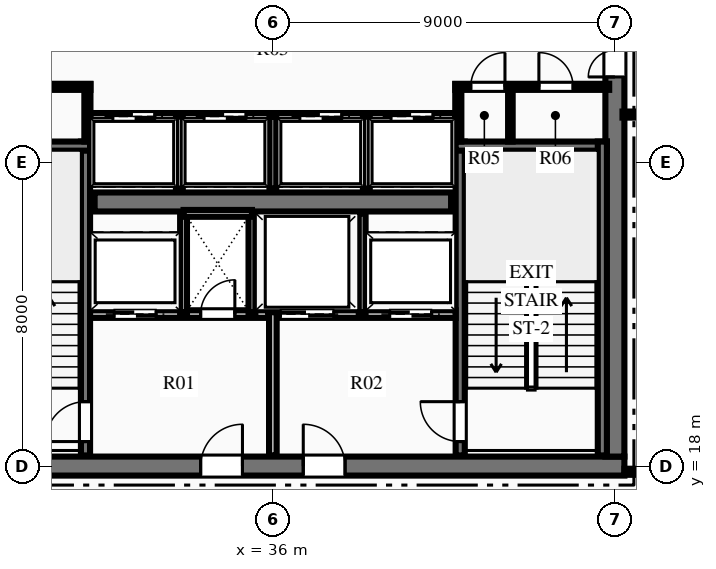
"""IFC4 building model, lengths in metres.
Left out: names, types, materials, properties, quantities, classifications, styles, units other than length and angle.
Written with IfcOpenShell. Run it as: python <this file> out.ifc"""

import sys

from ifc_helpers import new_model, si_unit, direction, frame, frame_2d, origin, place, context, subcontext, project, spatial, rectangle, extrude, element, fill, save


model = new_model("IFC4")
c1 = context("Model", 3, precision=1e-05, world=origin(), true_north=direction((0.0, 1.0)))
c2 = subcontext(c1, "Body", "Model", "MODEL_VIEW")
j1 = project(units=[si_unit("LENGTHUNIT", "METRE"), si_unit("PLANEANGLEUNIT", "RADIAN")], contexts=[c1])
p1 = place(None, origin())
s1 = spatial("IfcSite", under=j1, at=p1, CompositionType="ELEMENT")
p2 = place(p1, origin())
s2 = spatial("IfcBuilding", under=s1, at=p2, CompositionType="ELEMENT")
p3 = place(p2, frame((0.0, 0.0, 217.2)))
s3 = spatial("IfcBuildingStorey", under=s2, at=p3, CompositionType="ELEMENT", Elevation=217.2)
p4 = place(p3, frame((26.75, 18.0, 0.0), z_axis=(0.0, 0.0, 1.0), x_axis=(1.0, 0.0, 0.0)))
e1 = element("IfcWall", 1, at=p4, inside=s3, PredefinedType="SHEAR", context=c2, shape_type="SweptSolid", body=[
    extrude(rectangle(XDim=18.5, YDim=0.5, at=frame_2d((9.25, 0.0))), origin(), (0.0, 0.0, 1.0), 3.75),
])
p5 = place(p4, frame((7.35, 0.0, 0.0)))
e2 = element("IfcOpeningElement", 2, at=p5, cuts=e1, PredefinedType="OPENING", context=c2, shape_type="SweptSolid", body=[
    extrude(rectangle(XDim=1.1, YDim=2.15, at=frame_2d((0.55, 1.075))), frame((0.0, 0.26, 0.0), z_axis=(0.0, -1.0, 0.0), x_axis=(1.0, 0.0, 0.0)), (0.0, 0.0, 1.0), 0.52),
])
p6 = place(p4, frame((10.05, 0.0, 0.0)))
e3 = element("IfcOpeningElement", 3, at=p6, cuts=e1, PredefinedType="OPENING", context=c2, shape_type="SweptSolid", body=[
    extrude(rectangle(XDim=1.1, YDim=2.15, at=frame_2d((0.55, 1.075))), frame((0.0, 0.26, 0.0), z_axis=(0.0, -1.0, 0.0), x_axis=(1.0, 0.0, 0.0)), (0.0, 0.0, 1.0), 0.52),
])
p7 = place(p3, frame((45.0, 18.25, 0.0), z_axis=(0.0, 0.0, 1.0), x_axis=(0.0, 1.0, 0.0)))
e4 = element("IfcWall", 4, at=p7, inside=s3, PredefinedType="SHEAR", context=c2, shape_type="SweptSolid", body=[
    extrude(rectangle(XDim=15.5, YDim=0.5, at=frame_2d((7.75, 0.0))), origin(), (0.0, 0.0, 1.0), 3.75),
])
p8 = place(p7, frame((9.99, 0.0, 0.0)))
e5 = element("IfcOpeningElement", 5, at=p8, cuts=e4, PredefinedType="OPENING", context=c2, shape_type="SweptSolid", body=[
    extrude(rectangle(XDim=1.4, YDim=2.2, at=frame_2d((0.7, 1.1))), frame((0.0, 0.26, 0.0), z_axis=(0.0, -1.0, 0.0), x_axis=(1.0, 0.0, 0.0)), (0.0, 0.0, 1.0), 0.52),
])
p9 = place(p3, frame((31.31, 24.95, 0.0), z_axis=(0.0, 0.0, 1.0), x_axis=(1.0, 0.0, 0.0)))
e6 = element("IfcWall", 6, at=p9, inside=s3, PredefinedType="SHEAR", context=c2, shape_type="SweptSolid", body=[
    extrude(rectangle(XDim=9.38, YDim=0.5, at=frame_2d((4.69, 0.0))), origin(), (0.0, 0.0, 1.0), 3.75),
])
p10 = place(p3, frame((31.07, 18.28, 0.0), z_axis=(0.0, 0.0, 1.0), x_axis=(0.0, 1.0, 0.0)))
e7 = element("IfcWall", 7, at=p10, inside=s3, PredefinedType="SHEAR", context=c2, shape_type="SweptSolid", body=[
    extrude(rectangle(XDim=8.26, YDim=0.24, at=frame_2d((4.13, 0.0))), origin(), (0.0, 0.0, 1.0), 3.75),
])
p11 = place(p10, frame((0.365, 0.0, 0.0)))
e8 = element("IfcOpeningElement", 8, at=p11, cuts=e7, PredefinedType="OPENING", context=c2, shape_type="SweptSolid", body=[
    extrude(rectangle(XDim=1.05, YDim=2.15, at=frame_2d((0.525, 1.075))), frame((0.0, 0.13, 0.0), z_axis=(0.0, -1.0, 0.0), x_axis=(1.0, 0.0, 0.0)), (0.0, 0.0, 1.0), 0.26),
])
p12 = place(p3, frame((27.21, 26.42, 0.0), z_axis=(0.0, 0.0, 1.0), x_axis=(1.0, 0.0, 0.0)))
e9 = element("IfcWall", 9, at=p12, inside=s3, PredefinedType="SHEAR", context=c2, shape_type="SweptSolid", body=[
    extrude(rectangle(XDim=3.98, YDim=0.24, at=frame_2d((1.99, 0.0))), origin(), (0.0, 0.0, 1.0), 3.75),
])
p13 = place(p3, frame((40.93, 18.28, 0.0), z_axis=(0.0, 0.0, 1.0), x_axis=(0.0, 1.0, 0.0)))
e10 = element("IfcWall", 10, at=p13, inside=s3, PredefinedType="SHEAR", context=c2, shape_type="SweptSolid", body=[
    extrude(rectangle(XDim=8.26, YDim=0.24, at=frame_2d((4.13, 0.0))), origin(), (0.0, 0.0, 1.0), 3.75),
])
p14 = place(p13, frame((0.365, 0.0, 0.0)))
e11 = element("IfcOpeningElement", 11, at=p14, cuts=e10, PredefinedType="OPENING", context=c2, shape_type="SweptSolid", body=[
    extrude(rectangle(XDim=1.05, YDim=2.15, at=frame_2d((0.525, 1.075))), frame((0.0, 0.13, 0.0), z_axis=(0.0, -1.0, 0.0), x_axis=(1.0, 0.0, 0.0)), (0.0, 0.0, 1.0), 0.26),
])
p15 = place(p3, frame((40.81, 26.42, 0.0), z_axis=(0.0, 0.0, 1.0), x_axis=(1.0, 0.0, 0.0)))
e12 = element("IfcWall", 12, at=p15, inside=s3, PredefinedType="SHEAR", context=c2, shape_type="SweptSolid", body=[
    extrude(rectangle(XDim=3.98, YDim=0.24, at=frame_2d((1.99, 0.0))), origin(), (0.0, 0.0, 1.0), 3.75),
])
p16 = place(p3, frame((44.67, 18.28, 0.0), z_axis=(0.0, 0.0, 1.0), x_axis=(0.0, 1.0, 0.0)))
e13 = element("IfcWall", 13, at=p16, inside=s3, PredefinedType="SHEAR", context=c2, shape_type="SweptSolid", body=[
    extrude(rectangle(XDim=8.26, YDim=0.24, at=frame_2d((4.13, 0.0))), origin(), (0.0, 0.0, 1.0), 3.75),
])
p17 = place(p3, frame((36.0, 18.28, 0.0), z_axis=(0.0, 0.0, 1.0), x_axis=(0.0, 1.0, 0.0)))
e14 = element("IfcWall", 14, at=p17, inside=s3, PredefinedType="PARTITIONING", context=c2, shape_type="SweptSolid", body=[
    extrude(rectangle(XDim=3.77, YDim=0.2, at=frame_2d((1.885, 0.0))), origin(), (0.0, 0.0, 1.0), 3.47),
])
p18 = place(p3, frame((31.19, 22.0, 0.0), z_axis=(0.0, 0.0, 1.0), x_axis=(1.0, 0.0, 0.0)))
e15 = element("IfcWall", 15, at=p18, inside=s3, PredefinedType="PARTITIONING", context=c2, shape_type="SweptSolid", body=[
    extrude(rectangle(XDim=4.69, YDim=0.2, at=frame_2d((2.345, 0.0))), origin(), (0.0, 0.0, 1.0), 3.47),
])
p19 = place(p18, frame((2.91, 0.0, 0.0)))
e16 = element("IfcOpeningElement", 16, at=p19, cuts=e15, PredefinedType="OPENING", context=c2, shape_type="SweptSolid", body=[
    extrude(rectangle(XDim=0.9, YDim=2.15, at=frame_2d((0.45, 1.075))), frame((0.0, 0.11, 0.0), z_axis=(0.0, -1.0, 0.0), x_axis=(1.0, 0.0, 0.0)), (0.0, 0.0, 1.0), 0.22),
])
p20 = place(p18, frame((0.635, 0.0, 0.0)))
e17 = element("IfcOpeningElement", 17, at=p20, cuts=e15, PredefinedType="OPENING", context=c2, shape_type="SweptSolid", body=[
    extrude(rectangle(XDim=1.1, YDim=2.15, at=frame_2d((0.55, 1.075))), frame((0.0, 0.11, 0.0), z_axis=(0.0, -1.0, 0.0), x_axis=(1.0, 0.0, 0.0)), (0.0, 0.0, 1.0), 0.22),
])
p21 = place(p3, frame((36.12, 22.0, 0.0), z_axis=(0.0, 0.0, 1.0), x_axis=(1.0, 0.0, 0.0)))
e18 = element("IfcWall", 18, at=p21, inside=s3, PredefinedType="PARTITIONING", context=c2, shape_type="SweptSolid", body=[
    extrude(rectangle(XDim=4.69, YDim=0.2, at=frame_2d((2.345, 0.0))), origin(), (0.0, 0.0, 1.0), 3.47),
])
p22 = place(p21, frame((2.955, 0.0, 0.0)))
e19 = element("IfcOpeningElement", 19, at=p22, cuts=e18, PredefinedType="OPENING", context=c2, shape_type="SweptSolid", body=[
    extrude(rectangle(XDim=1.1, YDim=2.15, at=frame_2d((0.55, 1.075))), frame((0.0, 0.11, 0.0), z_axis=(0.0, -1.0, 0.0), x_axis=(1.0, 0.0, 0.0)), (0.0, 0.0, 1.0), 0.22),
])
p23 = place(p21, frame((0.08, 0.0, 0.0)))
e20 = element("IfcOpeningElement", 20, at=p23, cuts=e18, PredefinedType="OPENING", context=c2, shape_type="SweptSolid", body=[
    extrude(rectangle(XDim=1.4, YDim=2.2, at=frame_2d((0.7, 1.1))), frame((0.0, 0.11, 0.0), z_axis=(0.0, -1.0, 0.0), x_axis=(1.0, 0.0, 0.0)), (0.0, 0.0, 1.0), 0.22),
])
for number, where, z_axis, x_axis in (
    (21, (33.65, 22.05, 0.0), (0.0, 0.0, 1.0), (0.0, 1.0, 0.0)),
    (22, (35.45, 22.05, 0.0), (0.0, 0.0, 1.0), (0.0, 1.0, 0.0)),
):
    element("IfcWall", number, at=place(p3, frame(where, z_axis=z_axis, x_axis=x_axis)), inside=s3, PredefinedType="PARTITIONING", context=c2, shape_type="SweptSolid", body=[
        extrude(rectangle(XDim=2.6, YDim=0.18, at=frame_2d((1.3, 0.0))), origin(), (0.0, 0.0, 1.0), 3.47),
    ])
p24 = place(p3, frame((33.65, 24.65, 0.0), z_axis=(0.0, 0.0, 1.0), x_axis=(1.0, 0.0, 0.0)))
e23 = element("IfcWall", 23, at=p24, inside=s3, PredefinedType="PARTITIONING", context=c2, shape_type="SweptSolid", body=[
    extrude(rectangle(XDim=1.8, YDim=0.18, at=frame_2d((0.9, 0.0))), origin(), (0.0, 0.0, 1.0), 3.47),
])
p25 = place(p3, frame((38.35, 22.05, 0.0), z_axis=(0.0, 0.0, 1.0), x_axis=(0.0, 1.0, 0.0)))
e24 = element("IfcWall", 24, at=p25, inside=s3, PredefinedType="PARTITIONING", context=c2, shape_type="SweptSolid", body=[
    extrude(rectangle(XDim=2.6, YDim=0.18, at=frame_2d((1.3, 0.0))), origin(), (0.0, 0.0, 1.0), 3.47),
])
p26 = place(p3, frame((27.15, 27.98, 0.0), z_axis=(0.0, 0.0, 1.0), x_axis=(1.0, 0.0, 0.0)))
e25 = element("IfcWall", 25, at=p26, inside=s3, PredefinedType="PARTITIONING", context=c2, shape_type="SweptSolid", body=[
    extrude(rectangle(XDim=4.05, YDim=0.16, at=frame_2d((2.025, 0.0))), origin(), (0.0, 0.0, 1.0), 3.47),
])
p27 = place(p26, frame((1.625, 0.0, 0.0)))
e26 = element("IfcOpeningElement", 26, at=p27, cuts=e25, PredefinedType="OPENING", context=c2, shape_type="SweptSolid", body=[
    extrude(rectangle(XDim=0.95, YDim=2.15, at=frame_2d((0.475, 1.075))), frame((0.0, 0.09, 0.0), z_axis=(0.0, -1.0, 0.0), x_axis=(1.0, 0.0, 0.0)), (0.0, 0.0, 1.0), 0.18),
])
p28 = place(p3, frame((31.12, 26.54, 0.0), z_axis=(0.0, 0.0, 1.0), x_axis=(0.0, 1.0, 0.0)))
e27 = element("IfcWall", 27, at=p28, inside=s3, PredefinedType="PARTITIONING", context=c2, shape_type="SweptSolid", body=[
    extrude(rectangle(XDim=1.51, YDim=0.16, at=frame_2d((0.755, 0.0))), origin(), (0.0, 0.0, 1.0), 3.47),
])
p29 = place(p3, frame((40.8, 27.98, 0.0), z_axis=(0.0, 0.0, 1.0), x_axis=(1.0, 0.0, 0.0)))
e28 = element("IfcWall", 28, at=p29, inside=s3, PredefinedType="PARTITIONING", context=c2, shape_type="SweptSolid", body=[
    extrude(rectangle(XDim=4.05, YDim=0.16, at=frame_2d((2.025, 0.0))), origin(), (0.0, 0.0, 1.0), 3.47),
])
p30 = place(p29, frame((0.407, 0.0, 0.0)))
e29 = element("IfcOpeningElement", 29, at=p30, cuts=e28, PredefinedType="OPENING", context=c2, shape_type="SweptSolid", body=[
    extrude(rectangle(XDim=0.9, YDim=2.15, at=frame_2d((0.45, 1.075))), frame((0.0, 0.09, 0.0), z_axis=(0.0, -1.0, 0.0), x_axis=(1.0, 0.0, 0.0)), (0.0, 0.0, 1.0), 0.18),
])
p31 = place(p29, frame((2.2, 0.0, 0.0)))
e30 = element("IfcOpeningElement", 30, at=p31, cuts=e28, PredefinedType="OPENING", context=c2, shape_type="SweptSolid", body=[
    extrude(rectangle(XDim=0.9, YDim=2.15, at=frame_2d((0.45, 1.075))), frame((0.0, 0.09, 0.0), z_axis=(0.0, -1.0, 0.0), x_axis=(1.0, 0.0, 0.0)), (0.0, 0.0, 1.0), 0.18),
])
p32 = place(p3, frame((40.88, 26.54, 0.0), z_axis=(0.0, 0.0, 1.0), x_axis=(0.0, 1.0, 0.0)))
e31 = element("IfcWall", 31, at=p32, inside=s3, PredefinedType="PARTITIONING", context=c2, shape_type="SweptSolid", body=[
    extrude(rectangle(XDim=1.51, YDim=0.16, at=frame_2d((0.755, 0.0))), origin(), (0.0, 0.0, 1.0), 3.47),
])
p33 = place(p3, frame((42.25, 26.54, 0.0), z_axis=(0.0, 0.0, 1.0), x_axis=(0.0, 1.0, 0.0)))
e32 = element("IfcWall", 32, at=p33, inside=s3, PredefinedType="PARTITIONING", context=c2, shape_type="SweptSolid", body=[
    extrude(rectangle(XDim=1.44, YDim=0.12, at=frame_2d((0.72, 0.0))), origin(), (0.0, 0.0, 1.0), 3.47),
])
p34 = place(p3, frame((31.2, 27.2, 0.0), z_axis=(0.0, 0.0, 1.0), x_axis=(1.0, 0.0, 0.0)))
e33 = element("IfcWall", 33, at=p34, inside=s3, PredefinedType="PARTITIONING", context=c2, shape_type="SweptSolid", body=[
    extrude(rectangle(XDim=9.6, YDim=0.18, at=frame_2d((4.8, 0.0))), origin(), (0.0, 0.0, 1.0), 3.47),
])
p35 = place(p34, frame((0.59, 0.0, 0.0)))
e34 = element("IfcOpeningElement", 34, at=p35, cuts=e33, PredefinedType="OPENING", context=c2, shape_type="SweptSolid", body=[
    extrude(rectangle(XDim=1.1, YDim=2.15, at=frame_2d((0.55, 1.075))), frame((0.0, 0.1, 0.0), z_axis=(0.0, -1.0, 0.0), x_axis=(1.0, 0.0, 0.0)), (0.0, 0.0, 1.0), 0.2),
])
p36 = place(p34, frame((2.99, 0.0, 0.0)))
e35 = element("IfcOpeningElement", 35, at=p36, cuts=e33, PredefinedType="OPENING", context=c2, shape_type="SweptSolid", body=[
    extrude(rectangle(XDim=1.1, YDim=2.15, at=frame_2d((0.55, 1.075))), frame((0.0, 0.1, 0.0), z_axis=(0.0, -1.0, 0.0), x_axis=(1.0, 0.0, 0.0)), (0.0, 0.0, 1.0), 0.2),
])
p37 = place(p34, frame((5.51, 0.0, 0.0)))
e36 = element("IfcOpeningElement", 36, at=p37, cuts=e33, PredefinedType="OPENING", context=c2, shape_type="SweptSolid", body=[
    extrude(rectangle(XDim=1.1, YDim=2.15, at=frame_2d((0.55, 1.075))), frame((0.0, 0.1, 0.0), z_axis=(0.0, -1.0, 0.0), x_axis=(1.0, 0.0, 0.0)), (0.0, 0.0, 1.0), 0.2),
])
p38 = place(p34, frame((7.91, 0.0, 0.0)))
e37 = element("IfcOpeningElement", 37, at=p38, cuts=e33, PredefinedType="OPENING", context=c2, shape_type="SweptSolid", body=[
    extrude(rectangle(XDim=1.1, YDim=2.15, at=frame_2d((0.55, 1.075))), frame((0.0, 0.1, 0.0), z_axis=(0.0, -1.0, 0.0), x_axis=(1.0, 0.0, 0.0)), (0.0, 0.0, 1.0), 0.2),
])
for number, where, z_axis, x_axis in (
    (38, (33.54, 25.3, 0.0), (0.0, 0.0, 1.0), (0.0, 1.0, 0.0)),
    (39, (36.0, 25.3, 0.0), (0.0, 0.0, 1.0), (0.0, 1.0, 0.0)),
    (40, (38.46, 25.3, 0.0), (0.0, 0.0, 1.0), (0.0, 1.0, 0.0)),
):
    element("IfcWall", number, at=place(p3, frame(where, z_axis=z_axis, x_axis=x_axis)), inside=s3, PredefinedType="PARTITIONING", context=c2, shape_type="SweptSolid", body=[
        extrude(rectangle(XDim=1.9, YDim=0.18, at=frame_2d((0.95, 0.0))), origin(), (0.0, 0.0, 1.0), 3.47),
    ])
p39 = place(p3, frame((45.25, 17.85, 0.0), z_axis=(0.0, 0.0, 1.0), x_axis=(1.0, 0.0, 0.0)))
e41 = element("IfcWall", 41, at=p39, inside=s3, PredefinedType="PARTITIONING", context=c2, shape_type="SweptSolid", body=[
    extrude(rectangle(XDim=8.55, YDim=0.16, at=frame_2d((4.275, 0.0))), origin(), (0.0, 0.0, 1.0), 3.47),
])
p40 = place(p39, frame((2.211, 0.0, 0.0)))
e42 = element("IfcOpeningElement", 42, at=p40, cuts=e41, PredefinedType="OPENING", context=c2, shape_type="SweptSolid", body=[
    extrude(rectangle(XDim=1.05, YDim=2.15, at=frame_2d((0.525, 1.075))), frame((0.0, 0.09, 0.0), z_axis=(0.0, -1.0, 0.0), x_axis=(1.0, 0.0, 0.0)), (0.0, 0.0, 1.0), 0.18),
])
p41 = place(p3, frame((45.2, 27.25, 0.0), z_axis=(0.0, 0.0, 1.0), x_axis=(1.0, 0.0, 0.0)))
e43 = element("IfcWall", 43, at=p41, inside=s3, PredefinedType="PARTITIONING", context=c2, shape_type="SweptSolid", body=[
    extrude(rectangle(XDim=2.25, YDim=0.16, at=frame_2d((1.125, 0.0))), origin(), (0.0, 0.0, 1.0), 3.47),
])
p42 = place(p30, origin())
e44 = element("IfcDoor", 44, at=p42, inside=s3, OperationType="SINGLE_SWING_RIGHT", PredefinedType="DOOR", context=c2, shape_type="SweptSolid", body=[
    extrude(rectangle(XDim=0.9, YDim=2.15, at=frame_2d((0.45, 1.075))), frame((0.0, 0.025, 0.0), z_axis=(0.0, -1.0, 0.0), x_axis=(1.0, 0.0, 0.0)), (0.0, 0.0, 1.0), 0.05),
])
fill(e29, e44)
p43 = place(p31, origin())
e45 = element("IfcDoor", 45, at=p43, inside=s3, OperationType="SINGLE_SWING_LEFT", PredefinedType="DOOR", context=c2, shape_type="SweptSolid", body=[
    extrude(rectangle(XDim=0.9, YDim=2.15, at=frame_2d((0.45, 1.075))), frame((0.0, 0.025, 0.0), z_axis=(0.0, -1.0, 0.0), x_axis=(1.0, 0.0, 0.0)), (0.0, 0.0, 1.0), 0.05),
])
fill(e30, e45)
p44 = place(p11, origin())
e46 = element("IfcDoor", 46, at=p44, inside=s3, OperationType="SINGLE_SWING_LEFT", PredefinedType="DOOR", context=c2, shape_type="SweptSolid", body=[
    extrude(rectangle(XDim=1.05, YDim=2.15, at=frame_2d((0.525, 1.075))), frame((0.0, 0.025, 0.0), z_axis=(0.0, -1.0, 0.0), x_axis=(1.0, 0.0, 0.0)), (0.0, 0.0, 1.0), 0.05),
])
fill(e8, e46)
p45 = place(p14, origin())
e47 = element("IfcDoor", 47, at=p45, inside=s3, OperationType="SINGLE_SWING_RIGHT", PredefinedType="DOOR", context=c2, shape_type="SweptSolid", body=[
    extrude(rectangle(XDim=1.05, YDim=2.15, at=frame_2d((0.525, 1.075))), frame((0.0, 0.025, 0.0), z_axis=(0.0, -1.0, 0.0), x_axis=(1.0, 0.0, 0.0)), (0.0, 0.0, 1.0), 0.05),
])
fill(e11, e47)
p46 = place(p5, origin())
e48 = element("IfcDoor", 48, at=p46, inside=s3, OperationType="SINGLE_SWING_RIGHT", PredefinedType="DOOR", context=c2, shape_type="SweptSolid", body=[
    extrude(rectangle(XDim=1.1, YDim=2.15, at=frame_2d((0.55, 1.075))), frame((0.0, 0.025, 0.0), z_axis=(0.0, -1.0, 0.0), x_axis=(1.0, 0.0, 0.0)), (0.0, 0.0, 1.0), 0.05),
])
fill(e2, e48)
p47 = place(p6, origin())
e49 = element("IfcDoor", 49, at=p47, inside=s3, OperationType="SINGLE_SWING_LEFT", PredefinedType="DOOR", context=c2, shape_type="SweptSolid", body=[
    extrude(rectangle(XDim=1.1, YDim=2.15, at=frame_2d((0.55, 1.075))), frame((0.0, 0.025, 0.0), z_axis=(0.0, -1.0, 0.0), x_axis=(1.0, 0.0, 0.0)), (0.0, 0.0, 1.0), 0.05),
])
fill(e3, e49)
p48 = place(p19, origin())
e50 = element("IfcDoor", 50, at=p48, inside=s3, OperationType="SINGLE_SWING_RIGHT", PredefinedType="DOOR", context=c2, shape_type="SweptSolid", body=[
    extrude(rectangle(XDim=0.9, YDim=2.15, at=frame_2d((0.45, 1.075))), frame((0.0, 0.025, 0.0), z_axis=(0.0, -1.0, 0.0), x_axis=(1.0, 0.0, 0.0)), (0.0, 0.0, 1.0), 0.05),
])
fill(e16, e50)
p49 = place(p8, origin())
e51 = element("IfcDoor", 51, at=p49, inside=s3, OperationType="DOUBLE_DOOR_SINGLE_SWING", PredefinedType="DOOR", context=c2, shape_type="SweptSolid", body=[
    extrude(rectangle(XDim=1.4, YDim=2.2, at=frame_2d((0.7, 1.1))), frame((0.0, 0.025, 0.0), z_axis=(0.0, -1.0, 0.0), x_axis=(1.0, 0.0, 0.0)), (0.0, 0.0, 1.0), 0.05),
])
fill(e5, e51)
p50 = place(p35, origin())
e52 = element("IfcDoor", 52, at=p50, inside=s3, OperationType="SLIDING_TO_LEFT", PredefinedType="DOOR", context=c2, shape_type="SweptSolid", body=[
    extrude(rectangle(XDim=1.1, YDim=2.15, at=frame_2d((0.55, 1.075))), frame((0.0, 0.025, 0.0), z_axis=(0.0, -1.0, 0.0), x_axis=(1.0, 0.0, 0.0)), (0.0, 0.0, 1.0), 0.05),
])
fill(e34, e52)
p51 = place(p36, origin())
e53 = element("IfcDoor", 53, at=p51, inside=s3, OperationType="SLIDING_TO_LEFT", PredefinedType="DOOR", context=c2, shape_type="SweptSolid", body=[
    extrude(rectangle(XDim=1.1, YDim=2.15, at=frame_2d((0.55, 1.075))), frame((0.0, 0.025, 0.0), z_axis=(0.0, -1.0, 0.0), x_axis=(1.0, 0.0, 0.0)), (0.0, 0.0, 1.0), 0.05),
])
fill(e35, e53)
p52 = place(p37, origin())
e54 = element("IfcDoor", 54, at=p52, inside=s3, OperationType="SLIDING_TO_LEFT", PredefinedType="DOOR", context=c2, shape_type="SweptSolid", body=[
    extrude(rectangle(XDim=1.1, YDim=2.15, at=frame_2d((0.55, 1.075))), frame((0.0, 0.025, 0.0), z_axis=(0.0, -1.0, 0.0), x_axis=(1.0, 0.0, 0.0)), (0.0, 0.0, 1.0), 0.05),
])
fill(e36, e54)
p53 = place(p38, origin())
e55 = element("IfcDoor", 55, at=p53, inside=s3, OperationType="SLIDING_TO_LEFT", PredefinedType="DOOR", context=c2, shape_type="SweptSolid", body=[
    extrude(rectangle(XDim=1.1, YDim=2.15, at=frame_2d((0.55, 1.075))), frame((0.0, 0.025, 0.0), z_axis=(0.0, -1.0, 0.0), x_axis=(1.0, 0.0, 0.0)), (0.0, 0.0, 1.0), 0.05),
])
fill(e37, e55)
p54 = place(p20, origin())
e56 = element("IfcDoor", 56, at=p54, inside=s3, OperationType="SLIDING_TO_LEFT", PredefinedType="DOOR", context=c2, shape_type="SweptSolid", body=[
    extrude(rectangle(XDim=1.1, YDim=2.15, at=frame_2d((0.55, 1.075))), frame((0.0, 0.025, 0.0), z_axis=(0.0, -1.0, 0.0), x_axis=(1.0, 0.0, 0.0)), (0.0, 0.0, 1.0), 0.05),
])
fill(e17, e56)
p55 = place(p22, origin())
e57 = element("IfcDoor", 57, at=p55, inside=s3, OperationType="SLIDING_TO_LEFT", PredefinedType="DOOR", context=c2, shape_type="SweptSolid", body=[
    extrude(rectangle(XDim=1.1, YDim=2.15, at=frame_2d((0.55, 1.075))), frame((0.0, 0.025, 0.0), z_axis=(0.0, -1.0, 0.0), x_axis=(1.0, 0.0, 0.0)), (0.0, 0.0, 1.0), 0.05),
])
fill(e19, e57)
p56 = place(p23, origin())
e58 = element("IfcDoor", 58, at=p56, inside=s3, OperationType="SLIDING_TO_LEFT", PredefinedType="DOOR", context=c2, shape_type="SweptSolid", body=[
    extrude(rectangle(XDim=1.4, YDim=2.2, at=frame_2d((0.7, 1.1))), frame((0.0, 0.025, 0.0), z_axis=(0.0, -1.0, 0.0), x_axis=(1.0, 0.0, 0.0)), (0.0, 0.0, 1.0), 0.05),
])
fill(e20, e58)
save(model, sys.argv[1])
